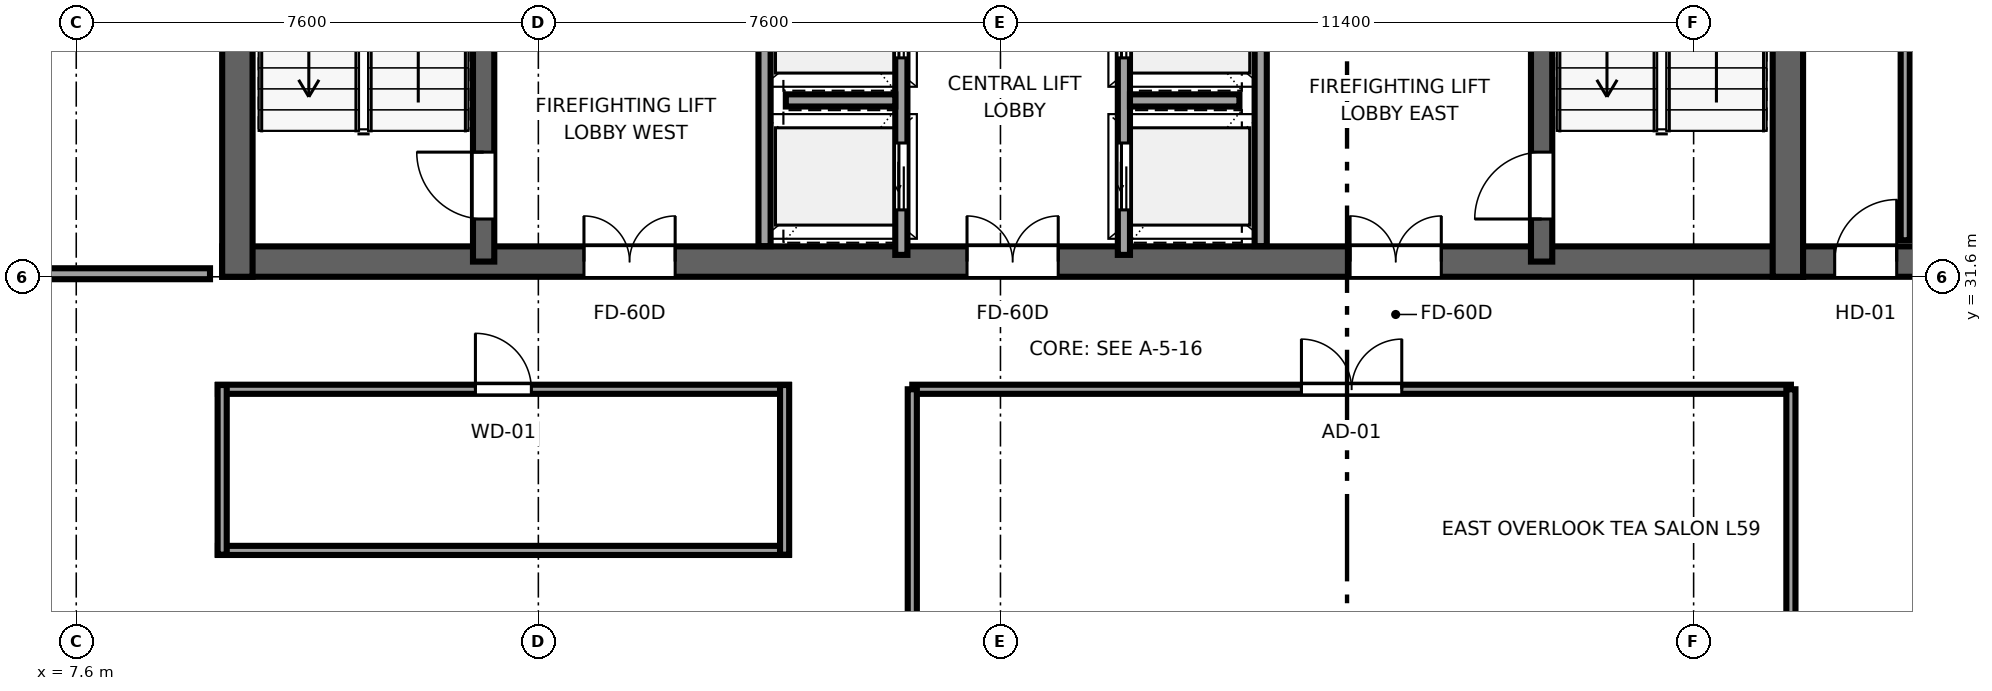
"""IFC4 building model, lengths in metres.
Left out: names, types, materials, properties, quantities, classifications, styles, units other than length and angle.
Written with IfcOpenShell. Run it as: python <this file> out.ifc"""

import sys

from ifc_helpers import new_model, si_unit, direction, frame, frame_2d, origin, place, context, subcontext, project, spatial, rectangle, extrude, source, transform, mapped, element, fill, save


model = new_model("IFC4")
c1 = context("Model", 3, precision=1e-05, world=origin(), true_north=direction((0.0, 1.0)))
c2 = subcontext(c1, "Body", "Model", "MODEL_VIEW")
j1 = project(units=[si_unit("LENGTHUNIT", "METRE"), si_unit("PLANEANGLEUNIT", "RADIAN")], contexts=[c1])
p1 = place(None, origin())
s1 = spatial("IfcSite", under=j1, at=p1, CompositionType="ELEMENT")
p2 = place(p1, origin())
s2 = spatial("IfcBuilding", under=s1, at=p2, CompositionType="ELEMENT")
p3 = place(p2, frame((0.0, 0.0, 223.9)))
s3 = spatial("IfcBuildingStorey", under=s2, at=p3, CompositionType="ELEMENT", Elevation=223.9)
p4 = place(p3, frame((10.0, 31.85, 0.0), z_axis=(0.0, 0.0, 1.0), x_axis=(1.0, 0.0, 0.0)))
e1 = element("IfcWall", 1, at=p4, inside=s3, PredefinedType="SHEAR", context=c2, shape_type="SweptSolid", body=[
    extrude(rectangle(XDim=26.0, YDim=0.5, at=frame_2d((13.0, 0.0))), origin(), (0.0, 0.0, 1.0), 3.55),
])
p5 = place(p4, frame((7.45, 0.0, 0.0), z_axis=(0.0, 0.0, 1.0), x_axis=(-1.0, 0.0, 0.0)))
e2 = element("IfcOpeningElement", 2, at=p5, cuts=e1, PredefinedType="OPENING", context=c2, shape_type="SweptSolid", body=[
    extrude(rectangle(XDim=1.5, YDim=2.04, at=frame_2d((0.75, 1.02))), frame((0.0, 0.26, 0.0), z_axis=(0.0, -1.0, 0.0), x_axis=(1.0, 0.0, 0.0)), (0.0, 0.0, 1.0), 0.52),
])
p6 = place(p4, frame((13.75, 0.0, 0.0), z_axis=(0.0, 0.0, 1.0), x_axis=(-1.0, 0.0, 0.0)))
e3 = element("IfcOpeningElement", 3, at=p6, cuts=e1, PredefinedType="OPENING", context=c2, shape_type="SweptSolid", body=[
    extrude(rectangle(XDim=1.5, YDim=2.04, at=frame_2d((0.75, 1.02))), frame((0.0, 0.26, 0.0), z_axis=(0.0, -1.0, 0.0), x_axis=(1.0, 0.0, 0.0)), (0.0, 0.0, 1.0), 0.52),
])
p7 = place(p4, frame((20.05, 0.0, 0.0), z_axis=(0.0, 0.0, 1.0), x_axis=(-1.0, 0.0, 0.0)))
e4 = element("IfcOpeningElement", 4, at=p7, cuts=e1, PredefinedType="OPENING", context=c2, shape_type="SweptSolid", body=[
    extrude(rectangle(XDim=1.5, YDim=2.04, at=frame_2d((0.75, 1.02))), frame((0.0, 0.26, 0.0), z_axis=(0.0, -1.0, 0.0), x_axis=(1.0, 0.0, 0.0)), (0.0, 0.0, 1.0), 0.52),
])
for number, where, z_axis, x_axis in (
    (5, (10.25, 31.6, 0.0), (0.0, 0.0, 1.0), (0.0, 1.0, 0.0)),
    (6, (35.75, 31.6, 0.0), (0.0, 0.0, 1.0), (0.0, 1.0, 0.0)),
):
    element("IfcWall", number, at=place(p3, frame(where, z_axis=z_axis, x_axis=x_axis)), inside=s3, PredefinedType="SHEAR", context=c2, shape_type="SweptSolid", body=[
        extrude(rectangle(XDim=13.6, YDim=0.5, at=frame_2d((6.8, 0.0))), origin(), (0.0, 0.0, 1.0), 3.55),
    ])
p8 = place(p3, frame((14.3, 31.85, 0.0), z_axis=(0.0, 0.0, 1.0), x_axis=(0.0, 1.0, 0.0)))
e7 = element("IfcWall", 7, at=p8, inside=s3, PredefinedType="SHEAR", context=c2, shape_type="SweptSolid", body=[
    extrude(rectangle(XDim=13.1, YDim=0.35, at=frame_2d((6.55, 0.0))), origin(), (0.0, 0.0, 1.0), 3.55),
])
p9 = place(p8, frame((0.7, 0.0, 0.0)))
e8 = element("IfcOpeningElement", 8, at=p9, cuts=e7, PredefinedType="OPENING", context=c2, shape_type="SweptSolid", body=[
    extrude(rectangle(XDim=1.1, YDim=2.12, at=frame_2d((0.55, 1.06))), frame((0.0, 0.185, 0.0), z_axis=(0.0, -1.0, 0.0), x_axis=(1.0, 0.0, 0.0)), (0.0, 0.0, 1.0), 0.37),
])
p10 = place(p3, frame((31.7, 31.85, 0.0), z_axis=(0.0, 0.0, 1.0), x_axis=(0.0, 1.0, 0.0)))
e9 = element("IfcWall", 9, at=p10, inside=s3, PredefinedType="SHEAR", context=c2, shape_type="SweptSolid", body=[
    extrude(rectangle(XDim=13.1, YDim=0.35, at=frame_2d((6.55, 0.0))), origin(), (0.0, 0.0, 1.0), 3.55),
])
p11 = place(p10, frame((1.8, 0.0, 0.0), z_axis=(0.0, 0.0, 1.0), x_axis=(-1.0, 0.0, 0.0)))
e10 = element("IfcOpeningElement", 10, at=p11, cuts=e9, PredefinedType="OPENING", context=c2, shape_type="SweptSolid", body=[
    extrude(rectangle(XDim=1.1, YDim=2.12, at=frame_2d((0.55, 1.06))), frame((0.0, 0.185, 0.0), z_axis=(0.0, -1.0, 0.0), x_axis=(1.0, 0.0, 0.0)), (0.0, 0.0, 1.0), 0.37),
])
p12 = place(p3, frame((36.0, 31.85, 0.0), z_axis=(0.0, 0.0, 1.0), x_axis=(1.0, 0.0, 0.0)))
e11 = element("IfcWall", 11, at=p12, inside=s3, PredefinedType="SHEAR", context=c2, shape_type="SweptSolid", body=[
    extrude(rectangle(XDim=3.8, YDim=0.5, at=frame_2d((1.9, 0.0))), origin(), (0.0, 0.0, 1.0), 3.55),
])
p13 = place(p12, frame((1.54, 0.0, 0.0), z_axis=(0.0, 0.0, 1.0), x_axis=(-1.0, 0.0, 0.0)))
e12 = element("IfcOpeningElement", 12, at=p13, cuts=e11, PredefinedType="OPENING", context=c2, shape_type="SweptSolid", body=[
    extrude(rectangle(XDim=1.02, YDim=2.03, at=frame_2d((0.51, 1.015))), frame((0.0, 0.26, 0.0), z_axis=(0.0, -1.0, 0.0), x_axis=(1.0, 0.0, 0.0)), (0.0, 0.0, 1.0), 0.52),
])
for number, where, z_axis, x_axis in (
    (13, (18.92, 32.104, 0.0), (0.0, 0.0, 1.0), (0.0, 1.0, 0.0)),
    (14, (27.08, 32.104, 0.0), (0.0, 0.0, 1.0), (0.0, 1.0, 0.0)),
):
    element("IfcWall", number, at=place(p3, frame(where, z_axis=z_axis, x_axis=x_axis)), inside=s3, PredefinedType="SOLIDWALL", context=c2, shape_type="SweptSolid", body=[
        extrude(rectangle(XDim=4.046, YDim=0.2, at=frame_2d((2.023, 0.0))), origin(), (0.0, 0.0, 1.0), 3.37),
    ])
p14 = place(p3, frame((21.17, 31.96, 0.0), z_axis=(0.0, 0.0, 1.0), x_axis=(0.0, 1.0, 0.0)))
e15 = element("IfcWall", 15, at=p14, inside=s3, PredefinedType="SOLIDWALL", context=c2, shape_type="SweptSolid", body=[
    extrude(rectangle(XDim=5.08, YDim=0.2, at=frame_2d((2.54, 0.0))), origin(), (0.0, 0.0, 1.0), 3.37),
])
p15 = place(p14, frame((0.74, 0.0, 0.0)))
e16 = element("IfcOpeningElement", 16, at=p15, cuts=e15, PredefinedType="OPENING", context=c2, shape_type="SweptSolid", body=[
    extrude(rectangle(XDim=1.1, YDim=2.12, at=frame_2d((0.55, 1.06))), frame((0.0, 0.11, 0.0), z_axis=(0.0, -1.0, 0.0), x_axis=(1.0, 0.0, 0.0)), (0.0, 0.0, 1.0), 0.22),
])
p16 = place(p14, frame((3.24, 0.0, 0.0)))
e17 = element("IfcOpeningElement", 17, at=p16, cuts=e15, PredefinedType="OPENING", context=c2, shape_type="SweptSolid", body=[
    extrude(rectangle(XDim=1.1, YDim=2.12, at=frame_2d((0.55, 1.06))), frame((0.0, 0.11, 0.0), z_axis=(0.0, -1.0, 0.0), x_axis=(1.0, 0.0, 0.0)), (0.0, 0.0, 1.0), 0.22),
])
p17 = place(p3, frame((19.27, 34.5, 0.0), z_axis=(0.0, 0.0, 1.0), x_axis=(1.0, 0.0, 0.0)))
e18 = element("IfcWall", 18, at=p17, inside=s3, PredefinedType="SOLIDWALL", context=c2, shape_type="SweptSolid", body=[
    extrude(rectangle(XDim=1.8, YDim=0.2, at=frame_2d((0.9, 0.0))), origin(), (0.0, 0.0, 1.0), 3.37),
])
p18 = place(p3, frame((24.83, 31.96, 0.0), z_axis=(0.0, 0.0, 1.0), x_axis=(0.0, 1.0, 0.0)))
e19 = element("IfcWall", 19, at=p18, inside=s3, PredefinedType="SOLIDWALL", context=c2, shape_type="SweptSolid", body=[
    extrude(rectangle(XDim=5.08, YDim=0.2, at=frame_2d((2.54, 0.0))), origin(), (0.0, 0.0, 1.0), 3.37),
])
p19 = place(p18, frame((0.74, 0.0, 0.0)))
e20 = element("IfcOpeningElement", 20, at=p19, cuts=e19, PredefinedType="OPENING", context=c2, shape_type="SweptSolid", body=[
    extrude(rectangle(XDim=1.1, YDim=2.12, at=frame_2d((0.55, 1.06))), frame((0.0, 0.11, 0.0), z_axis=(0.0, -1.0, 0.0), x_axis=(1.0, 0.0, 0.0)), (0.0, 0.0, 1.0), 0.22),
])
p20 = place(p18, frame((3.24, 0.0, 0.0)))
e21 = element("IfcOpeningElement", 21, at=p20, cuts=e19, PredefinedType="OPENING", context=c2, shape_type="SweptSolid", body=[
    extrude(rectangle(XDim=1.1, YDim=2.12, at=frame_2d((0.55, 1.06))), frame((0.0, 0.11, 0.0), z_axis=(0.0, -1.0, 0.0), x_axis=(1.0, 0.0, 0.0)), (0.0, 0.0, 1.0), 0.22),
])
p21 = place(p3, frame((24.93, 34.5, 0.0), z_axis=(0.0, 0.0, 1.0), x_axis=(1.0, 0.0, 0.0)))
e22 = element("IfcWall", 22, at=p21, inside=s3, PredefinedType="SOLIDWALL", context=c2, shape_type="SweptSolid", body=[
    extrude(rectangle(XDim=1.8, YDim=0.2, at=frame_2d((0.9, 0.0))), origin(), (0.0, 0.0, 1.0), 3.37),
])
p22 = place(p3, frame((37.68, 32.2, 0.0), z_axis=(0.0, 0.0, 1.0), x_axis=(0.0, 1.0, 0.0)))
e23 = element("IfcWall", 23, at=p22, inside=s3, PredefinedType="PARTITIONING", context=c2, shape_type="SweptSolid", body=[
    extrude(rectangle(XDim=8.0, YDim=0.15, at=frame_2d((4.0, 0.0))), origin(), (0.0, 0.0, 1.0), 3.37),
])
p23 = place(p22, frame((3.49, 0.0, 0.0)))
e24 = element("IfcOpeningElement", 24, at=p23, cuts=e23, PredefinedType="OPENING", context=c2, shape_type="SweptSolid", body=[
    extrude(rectangle(XDim=1.02, YDim=2.03, at=frame_2d((0.51, 1.015))), frame((0.0, 0.085, 0.0), z_axis=(0.0, -1.0, 0.0), x_axis=(1.0, 0.0, 0.0)), (0.0, 0.0, 1.0), 0.17),
])
p24 = place(p3, frame((2.9, 31.65, 0.0), z_axis=(0.0, 0.0, 1.0), x_axis=(1.0, 0.0, 0.0)))
e25 = element("IfcWall", 25, at=p24, inside=s3, PredefinedType="PARTITIONING", context=c2, shape_type="SweptSolid", body=[
    extrude(rectangle(XDim=6.9, YDim=0.18, at=frame_2d((3.45, 0.0))), origin(), (0.0, 0.0, 1.0), 3.37),
])
p25 = place(p24, frame((2.625, 0.0, 0.0)))
e26 = element("IfcOpeningElement", 26, at=p25, cuts=e25, PredefinedType="OPENING", context=c2, shape_type="SweptSolid", body=[
    extrude(rectangle(XDim=1.65, YDim=2.15, at=frame_2d((0.825, 1.075))), frame((0.0, 0.1, 0.0), z_axis=(0.0, -1.0, 0.0), x_axis=(1.0, 0.0, 0.0)), (0.0, 0.0, 1.0), 0.2),
])
p26 = place(p3, frame((9.93, 27.1, 0.0), z_axis=(0.0, 0.0, 1.0), x_axis=(1.0, 0.0, 0.0)))
e27 = element("IfcWall", 27, at=p26, inside=s3, PredefinedType="PARTITIONING", context=c2, shape_type="SweptSolid", body=[
    extrude(rectangle(XDim=9.39, YDim=0.15, at=frame_2d((4.695, 0.0))), origin(), (0.0, 0.0, 1.0), 3.37),
])
p27 = place(p3, frame((9.93, 29.75, 0.0), z_axis=(0.0, 0.0, 1.0), x_axis=(1.0, 0.0, 0.0)))
e28 = element("IfcWall", 28, at=p27, inside=s3, PredefinedType="PARTITIONING", context=c2, shape_type="SweptSolid", body=[
    extrude(rectangle(XDim=9.39, YDim=0.15, at=frame_2d((4.695, 0.0))), origin(), (0.0, 0.0, 1.0), 3.37),
])
p28 = place(p27, frame((4.235, 0.0, 0.0)))
e29 = element("IfcOpeningElement", 29, at=p28, cuts=e28, PredefinedType="OPENING", context=c2, shape_type="SweptSolid", body=[
    extrude(rectangle(XDim=0.92, YDim=2.01, at=frame_2d((0.46, 1.005))), frame((0.0, 0.085, 0.0), z_axis=(0.0, -1.0, 0.0), x_axis=(1.0, 0.0, 0.0)), (0.0, 0.0, 1.0), 0.17),
])
for number, where, z_axis, x_axis in (
    (30, (10.0, 27.03, 0.0), (0.0, 0.0, 1.0), (0.0, 1.0, 0.0)),
    (31, (19.25, 27.03, 0.0), (0.0, 0.0, 1.0), (0.0, 1.0, 0.0)),
):
    element("IfcWall", number, at=place(p3, frame(where, z_axis=z_axis, x_axis=x_axis)), inside=s3, PredefinedType="PARTITIONING", context=c2, shape_type="SweptSolid", body=[
        extrude(rectangle(XDim=2.79, YDim=0.15, at=frame_2d((1.395, 0.0))), origin(), (0.0, 0.0, 1.0), 3.37),
    ])
p29 = place(p3, frame((21.35, 29.75, 0.0), z_axis=(0.0, 0.0, 1.0), x_axis=(1.0, 0.0, 0.0)))
e32 = element("IfcWall", 32, at=p29, inside=s3, PredefinedType="PARTITIONING", context=c2, shape_type="SweptSolid", body=[
    extrude(rectangle(XDim=14.45, YDim=0.15, at=frame_2d((7.225, 0.0))), origin(), (0.0, 0.0, 1.0), 3.37),
])
p30 = place(p29, frame((6.4, 0.0, 0.0)))
e33 = element("IfcOpeningElement", 33, at=p30, cuts=e32, PredefinedType="OPENING", context=c2, shape_type="SweptSolid", body=[
    extrude(rectangle(XDim=1.65, YDim=2.15, at=frame_2d((0.825, 1.075))), frame((0.0, 0.085, 0.0), z_axis=(0.0, -1.0, 0.0), x_axis=(1.0, 0.0, 0.0)), (0.0, 0.0, 1.0), 0.17),
])
for number, where, z_axis, x_axis in (
    (34, (21.35, 25.0, 0.0), (0.0, 0.0, 1.0), (0.0, 1.0, 0.0)),
    (35, (35.8, 25.0, 0.0), (0.0, 0.0, 1.0), (0.0, 1.0, 0.0)),
):
    element("IfcWall", number, at=place(p3, frame(where, z_axis=z_axis, x_axis=x_axis)), inside=s3, PredefinedType="PARTITIONING", context=c2, shape_type="SweptSolid", body=[
        extrude(rectangle(XDim=4.75, YDim=0.15, at=frame_2d((2.375, 0.0))), origin(), (0.0, 0.0, 1.0), 3.37),
    ])
m1 = source(origin(), c2, "Body", "SweptSolid", [
    extrude(rectangle(XDim=1.1, YDim=2.12, at=frame_2d((0.55, 1.06))), frame((0.0, 0.025, 0.0), z_axis=(0.0, -1.0, 0.0), x_axis=(1.0, 0.0, 0.0)), (0.0, 0.0, 1.0), 0.05),
])
p31 = place(p9, origin())
e36 = element("IfcDoor", 36, at=p31, inside=s3, OperationType="SINGLE_SWING_RIGHT", PredefinedType="DOOR", context=c2, shape_type="MappedRepresentation", body=[
    mapped(m1, transform((0.0, 0.0, 0.0), x_axis=(1.0, 0.0, 0.0), y_axis=(0.0, 1.0, 0.0), z_axis=(0.0, 0.0, 1.0), scale=1.0)),
])
fill(e8, e36)
p32 = place(p11, origin())
e37 = element("IfcDoor", 37, at=p32, inside=s3, OperationType="SINGLE_SWING_LEFT", PredefinedType="DOOR", context=c2, shape_type="MappedRepresentation", body=[
    mapped(m1, transform((0.0, 0.0, 0.0), x_axis=(1.0, 0.0, 0.0), y_axis=(0.0, 1.0, 0.0), z_axis=(0.0, 0.0, 1.0), scale=1.0)),
])
fill(e10, e37)
m2 = source(origin(), c2, "Body", "SweptSolid", [
    extrude(rectangle(XDim=1.5, YDim=2.04, at=frame_2d((0.75, 1.02))), frame((0.0, 0.025, 0.0), z_axis=(0.0, -1.0, 0.0), x_axis=(1.0, 0.0, 0.0)), (0.0, 0.0, 1.0), 0.05),
])
p33 = place(p5, origin())
e38 = element("IfcDoor", 38, at=p33, inside=s3, OperationType="DOUBLE_DOOR_SINGLE_SWING", PredefinedType="DOOR", context=c2, shape_type="MappedRepresentation", body=[
    mapped(m2, transform((0.0, 0.0, 0.0), x_axis=(1.0, 0.0, 0.0), y_axis=(0.0, 1.0, 0.0), z_axis=(0.0, 0.0, 1.0), scale=1.0)),
])
fill(e2, e38)
p34 = place(p6, origin())
e39 = element("IfcDoor", 39, at=p34, inside=s3, OperationType="DOUBLE_DOOR_SINGLE_SWING", PredefinedType="DOOR", context=c2, shape_type="MappedRepresentation", body=[
    mapped(m2, transform((0.0, 0.0, 0.0), x_axis=(1.0, 0.0, 0.0), y_axis=(0.0, 1.0, 0.0), z_axis=(0.0, 0.0, 1.0), scale=1.0)),
])
fill(e3, e39)
p35 = place(p7, origin())
e40 = element("IfcDoor", 40, at=p35, inside=s3, OperationType="DOUBLE_DOOR_SINGLE_SWING", PredefinedType="DOOR", context=c2, shape_type="MappedRepresentation", body=[
    mapped(m2, transform((0.0, 0.0, 0.0), x_axis=(1.0, 0.0, 0.0), y_axis=(0.0, 1.0, 0.0), z_axis=(0.0, 0.0, 1.0), scale=1.0)),
])
fill(e4, e40)
m3 = source(origin(), c2, "Body", "SweptSolid", [
    extrude(rectangle(XDim=1.02, YDim=2.03, at=frame_2d((0.51, 1.015))), frame((0.0, 0.025, 0.0), z_axis=(0.0, -1.0, 0.0), x_axis=(1.0, 0.0, 0.0)), (0.0, 0.0, 1.0), 0.05),
])
p36 = place(p13, origin())
e41 = element("IfcDoor", 41, at=p36, inside=s3, OperationType="SINGLE_SWING_RIGHT", PredefinedType="DOOR", context=c2, shape_type="MappedRepresentation", body=[
    mapped(m3, transform((0.0, 0.0, 0.0), x_axis=(1.0, 0.0, 0.0), y_axis=(0.0, 1.0, 0.0), z_axis=(0.0, 0.0, 1.0), scale=1.0)),
])
fill(e12, e41)
m4 = source(origin(), c2, "Body", "SweptSolid", [
    extrude(rectangle(XDim=1.1, YDim=2.12, at=frame_2d((0.55, 1.06))), frame((0.0, 0.025, 0.0), z_axis=(0.0, -1.0, 0.0), x_axis=(1.0, 0.0, 0.0)), (0.0, 0.0, 1.0), 0.05),
])
p37 = place(p15, origin())
e42 = element("IfcDoor", 42, at=p37, inside=s3, OperationType="SLIDING_TO_LEFT", PredefinedType="DOOR", context=c2, shape_type="MappedRepresentation", body=[
    mapped(m4, transform((0.0, 0.0, 0.0), x_axis=(1.0, 0.0, 0.0), y_axis=(0.0, 1.0, 0.0), z_axis=(0.0, 0.0, 1.0), scale=1.0)),
])
fill(e16, e42)
p38 = place(p16, origin())
e43 = element("IfcDoor", 43, at=p38, inside=s3, OperationType="SLIDING_TO_RIGHT", PredefinedType="DOOR", context=c2, shape_type="MappedRepresentation", body=[
    mapped(m4, transform((0.0, 0.0, 0.0), x_axis=(1.0, 0.0, 0.0), y_axis=(0.0, 1.0, 0.0), z_axis=(0.0, 0.0, 1.0), scale=1.0)),
])
fill(e17, e43)
p39 = place(p19, origin())
e44 = element("IfcDoor", 44, at=p39, inside=s3, OperationType="SLIDING_TO_LEFT", PredefinedType="DOOR", context=c2, shape_type="MappedRepresentation", body=[
    mapped(m4, transform((0.0, 0.0, 0.0), x_axis=(1.0, 0.0, 0.0), y_axis=(0.0, 1.0, 0.0), z_axis=(0.0, 0.0, 1.0), scale=1.0)),
])
fill(e20, e44)
p40 = place(p20, origin())
e45 = element("IfcDoor", 45, at=p40, inside=s3, OperationType="SLIDING_TO_RIGHT", PredefinedType="DOOR", context=c2, shape_type="MappedRepresentation", body=[
    mapped(m4, transform((0.0, 0.0, 0.0), x_axis=(1.0, 0.0, 0.0), y_axis=(0.0, 1.0, 0.0), z_axis=(0.0, 0.0, 1.0), scale=1.0)),
])
fill(e21, e45)
m5 = source(origin(), c2, "Body", "SweptSolid", [
    extrude(rectangle(XDim=0.92, YDim=2.01, at=frame_2d((0.46, 1.005))), frame((0.0, 0.025, 0.0), z_axis=(0.0, -1.0, 0.0), x_axis=(1.0, 0.0, 0.0)), (0.0, 0.0, 1.0), 0.05),
])
p41 = place(p28, origin())
e46 = element("IfcDoor", 46, at=p41, inside=s3, OperationType="SINGLE_SWING_LEFT", PredefinedType="DOOR", context=c2, shape_type="MappedRepresentation", body=[
    mapped(m5, transform((0.0, 0.0, 0.0), x_axis=(1.0, 0.0, 0.0), y_axis=(0.0, 1.0, 0.0), z_axis=(0.0, 0.0, 1.0), scale=1.0)),
])
fill(e29, e46)
m6 = source(origin(), c2, "Body", "SweptSolid", [
    extrude(rectangle(XDim=1.65, YDim=2.15, at=frame_2d((0.825, 1.075))), frame((0.0, 0.025, 0.0), z_axis=(0.0, -1.0, 0.0), x_axis=(1.0, 0.0, 0.0)), (0.0, 0.0, 1.0), 0.05),
])
p42 = place(p30, origin())
e47 = element("IfcDoor", 47, at=p42, inside=s3, OperationType="DOUBLE_DOOR_SINGLE_SWING", PredefinedType="DOOR", context=c2, shape_type="MappedRepresentation", body=[
    mapped(m6, transform((0.0, 0.0, 0.0), x_axis=(1.0, 0.0, 0.0), y_axis=(0.0, 1.0, 0.0), z_axis=(0.0, 0.0, 1.0), scale=1.0)),
])
fill(e33, e47)
save(model, sys.argv[1])
